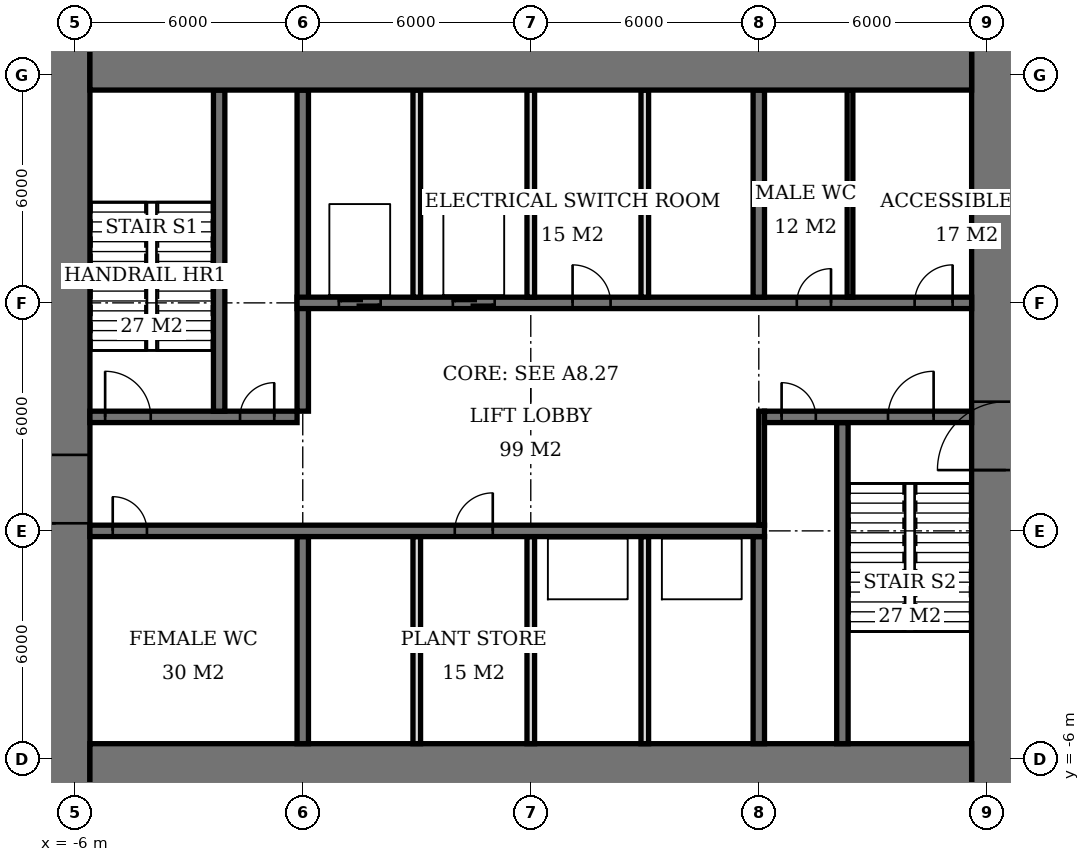
"""IFC4 building model, lengths in metres.
Left out: names, types, materials, properties, quantities, classifications, styles, units other than length and angle.
Written with IfcOpenShell. Run it as: python <this file> out.ifc"""

import sys

from ifc_helpers import new_model, si_unit, direction, frame, frame_2d, origin, place, context, subcontext, project, spatial, rectangle, extrude, element, fill, save


model = new_model("IFC4")
c1 = context("Model", 3, precision=1e-05, world=origin(), true_north=direction((0.0, 1.0)))
c2 = subcontext(c1, "Body", "Model", "MODEL_VIEW")
j1 = project(units=[si_unit("LENGTHUNIT", "METRE"), si_unit("PLANEANGLEUNIT", "RADIAN")], contexts=[c1])
p1 = place(None, origin())
s1 = spatial("IfcSite", under=j1, at=p1, CompositionType="ELEMENT")
p2 = place(p1, origin())
s2 = spatial("IfcBuilding", under=s1, at=p2, CompositionType="ELEMENT")
p3 = place(p2, frame((0.0, 0.0, 239.6)))
s3 = spatial("IfcBuildingStorey", under=s2, at=p3, CompositionType="ELEMENT", Elevation=239.6)
for number, where, z_axis, x_axis in (
    (1, (-5.6, -6.6, 0.0), (0.0, 0.0, 1.0), (1.0, 0.0, 0.0)),
    (2, (-5.6, 12.6, 0.0), (0.0, 0.0, 1.0), (1.0, 0.0, 0.0)),
):
    element("IfcWall", number, at=place(p3, frame(where, z_axis=z_axis, x_axis=x_axis)), inside=s3, PredefinedType="SHEAR", context=c2, shape_type="SweptSolid", body=[
        extrude(rectangle(XDim=23.2, YDim=2.0, at=frame_2d((11.6, 0.0))), origin(), (0.0, 0.0, 1.0), 5.4),
    ])
p4 = place(p3, frame((-6.5, -7.6, 0.0), z_axis=(0.0, 0.0, 1.0), x_axis=(0.0, 1.0, 0.0)))
e3 = element("IfcWall", 3, at=p4, inside=s3, PredefinedType="SHEAR", context=c2, shape_type="SweptSolid", body=[
    extrude(rectangle(XDim=21.2, YDim=1.8, at=frame_2d((10.6, 0.0))), origin(), (0.0, 0.0, 1.0), 5.4),
])
p5 = place(p4, frame((7.8, 0.0, 0.0)))
e4 = element("IfcOpeningElement", 4, at=p5, cuts=e3, PredefinedType="OPENING", context=c2, shape_type="SweptSolid", body=[
    extrude(rectangle(XDim=1.8, YDim=2.4, at=frame_2d((0.9, 1.2))), frame((0.0, 0.91, 0.0), z_axis=(0.0, -1.0, 0.0), x_axis=(1.0, 0.0, 0.0)), (0.0, 0.0, 1.0), 1.82),
])
p6 = place(p3, frame((18.5, -7.6, 0.0), z_axis=(0.0, 0.0, 1.0), x_axis=(0.0, 1.0, 0.0)))
e5 = element("IfcWall", 5, at=p6, inside=s3, PredefinedType="SHEAR", context=c2, shape_type="SweptSolid", body=[
    extrude(rectangle(XDim=21.2, YDim=1.8, at=frame_2d((10.6, 0.0))), origin(), (0.0, 0.0, 1.0), 5.4),
])
p7 = place(p6, frame((9.2, 0.0, 0.0)))
e6 = element("IfcOpeningElement", 6, at=p7, cuts=e5, PredefinedType="OPENING", context=c2, shape_type="SweptSolid", body=[
    extrude(rectangle(XDim=1.8, YDim=2.4, at=frame_2d((0.9, 1.2))), frame((0.0, 0.91, 0.0), z_axis=(0.0, -1.0, 0.0), x_axis=(1.0, 0.0, 0.0)), (0.0, 0.0, 1.0), 1.82),
])
p8 = place(p3, frame((-5.6, 0.0, 0.0), z_axis=(0.0, 0.0, 1.0), x_axis=(1.0, 0.0, 0.0)))
e7 = element("IfcWall", 7, at=p8, inside=s3, PredefinedType="SHEAR", context=c2, shape_type="SweptSolid", body=[
    extrude(rectangle(XDim=17.75, YDim=0.3, at=frame_2d((8.875, 0.0))), origin(), (0.0, 0.0, 1.0), 5.4),
])
p9 = place(p8, frame((0.6, 0.0, 0.0)))
e8 = element("IfcOpeningElement", 8, at=p9, cuts=e7, PredefinedType="OPENING", context=c2, shape_type="SweptSolid", body=[
    extrude(rectangle(XDim=0.9, YDim=2.1, at=frame_2d((0.45, 1.05))), frame((0.0, 0.16, 0.0), z_axis=(0.0, -1.0, 0.0), x_axis=(1.0, 0.0, 0.0)), (0.0, 0.0, 1.0), 0.32),
])
p10 = place(p8, frame((9.6, 0.0, 0.0)))
e9 = element("IfcOpeningElement", 9, at=p10, cuts=e7, PredefinedType="OPENING", context=c2, shape_type="SweptSolid", body=[
    extrude(rectangle(XDim=1.0, YDim=2.1, at=frame_2d((0.5, 1.05))), frame((0.0, 0.16, 0.0), z_axis=(0.0, -1.0, 0.0), x_axis=(1.0, 0.0, 0.0)), (0.0, 0.0, 1.0), 0.32),
])
p11 = place(p3, frame((-5.6, 3.0, 0.0), z_axis=(0.0, 0.0, 1.0), x_axis=(1.0, 0.0, 0.0)))
e10 = element("IfcWall", 10, at=p11, inside=s3, PredefinedType="SHEAR", context=c2, shape_type="SweptSolid", body=[
    extrude(rectangle(XDim=5.45, YDim=0.3, at=frame_2d((2.725, 0.0))), origin(), (0.0, 0.0, 1.0), 5.4),
])
p12 = place(p11, frame((0.4, 0.0, 0.0)))
e11 = element("IfcOpeningElement", 11, at=p12, cuts=e10, PredefinedType="OPENING", context=c2, shape_type="SweptSolid", body=[
    extrude(rectangle(XDim=1.2, YDim=2.1, at=frame_2d((0.6, 1.05))), frame((0.0, 0.16, 0.0), z_axis=(0.0, -1.0, 0.0), x_axis=(1.0, 0.0, 0.0)), (0.0, 0.0, 1.0), 0.32),
])
p13 = place(p11, frame((3.95, 0.0, 0.0)))
e12 = element("IfcOpeningElement", 12, at=p13, cuts=e10, PredefinedType="OPENING", context=c2, shape_type="SweptSolid", body=[
    extrude(rectangle(XDim=0.9, YDim=2.1, at=frame_2d((0.45, 1.05))), frame((0.0, 0.16, 0.0), z_axis=(0.0, -1.0, 0.0), x_axis=(1.0, 0.0, 0.0)), (0.0, 0.0, 1.0), 0.32),
])
p14 = place(p3, frame((12.15, 3.0, 0.0), z_axis=(0.0, 0.0, 1.0), x_axis=(1.0, 0.0, 0.0)))
e13 = element("IfcWall", 13, at=p14, inside=s3, PredefinedType="SHEAR", context=c2, shape_type="SweptSolid", body=[
    extrude(rectangle(XDim=5.45, YDim=0.3, at=frame_2d((2.725, 0.0))), origin(), (0.0, 0.0, 1.0), 5.4),
])
p15 = place(p14, frame((3.25, 0.0, 0.0)))
e14 = element("IfcOpeningElement", 14, at=p15, cuts=e13, PredefinedType="OPENING", context=c2, shape_type="SweptSolid", body=[
    extrude(rectangle(XDim=1.2, YDim=2.1, at=frame_2d((0.6, 1.05))), frame((0.0, 0.16, 0.0), z_axis=(0.0, -1.0, 0.0), x_axis=(1.0, 0.0, 0.0)), (0.0, 0.0, 1.0), 0.32),
])
p16 = place(p14, frame((0.45, 0.0, 0.0)))
e15 = element("IfcOpeningElement", 15, at=p16, cuts=e13, PredefinedType="OPENING", context=c2, shape_type="SweptSolid", body=[
    extrude(rectangle(XDim=0.9, YDim=2.1, at=frame_2d((0.45, 1.05))), frame((0.0, 0.16, 0.0), z_axis=(0.0, -1.0, 0.0), x_axis=(1.0, 0.0, 0.0)), (0.0, 0.0, 1.0), 0.32),
])
p17 = place(p3, frame((-0.15, 6.0, 0.0), z_axis=(0.0, 0.0, 1.0), x_axis=(1.0, 0.0, 0.0)))
e16 = element("IfcWall", 16, at=p17, inside=s3, PredefinedType="SHEAR", context=c2, shape_type="SweptSolid", body=[
    extrude(rectangle(XDim=17.75, YDim=0.3, at=frame_2d((8.875, 0.0))), origin(), (0.0, 0.0, 1.0), 5.4),
])
p18 = place(p17, frame((13.15, 0.0, 0.0)))
e17 = element("IfcOpeningElement", 17, at=p18, cuts=e16, PredefinedType="OPENING", context=c2, shape_type="SweptSolid", body=[
    extrude(rectangle(XDim=0.9, YDim=2.1, at=frame_2d((0.45, 1.05))), frame((0.0, 0.16, 0.0), z_axis=(0.0, -1.0, 0.0), x_axis=(1.0, 0.0, 0.0)), (0.0, 0.0, 1.0), 0.32),
])
p19 = place(p17, frame((16.25, 0.0, 0.0)))
e18 = element("IfcOpeningElement", 18, at=p19, cuts=e16, PredefinedType="OPENING", context=c2, shape_type="SweptSolid", body=[
    extrude(rectangle(XDim=1.0, YDim=2.1, at=frame_2d((0.5, 1.05))), frame((0.0, 0.16, 0.0), z_axis=(0.0, -1.0, 0.0), x_axis=(1.0, 0.0, 0.0)), (0.0, 0.0, 1.0), 0.32),
])
p20 = place(p17, frame((7.25, 0.0, 0.0)))
e19 = element("IfcOpeningElement", 19, at=p20, cuts=e16, PredefinedType="OPENING", context=c2, shape_type="SweptSolid", body=[
    extrude(rectangle(XDim=1.0, YDim=2.1, at=frame_2d((0.5, 1.05))), frame((0.0, 0.16, 0.0), z_axis=(0.0, -1.0, 0.0), x_axis=(1.0, 0.0, 0.0)), (0.0, 0.0, 1.0), 0.32),
])
p21 = place(p17, frame((1.1, 0.0, 0.0)))
e20 = element("IfcOpeningElement", 20, at=p21, cuts=e16, PredefinedType="OPENING", context=c2, shape_type="SweptSolid", body=[
    extrude(rectangle(XDim=1.1, YDim=2.1, at=frame_2d((0.55, 1.05))), frame((0.0, 0.16, 0.0), z_axis=(0.0, -1.0, 0.0), x_axis=(1.0, 0.0, 0.0)), (0.0, 0.0, 1.0), 0.32),
])
p22 = place(p17, frame((4.1, 0.0, 0.0)))
e21 = element("IfcOpeningElement", 21, at=p22, cuts=e16, PredefinedType="OPENING", context=c2, shape_type="SweptSolid", body=[
    extrude(rectangle(XDim=1.1, YDim=2.1, at=frame_2d((0.55, 1.05))), frame((0.0, 0.16, 0.0), z_axis=(0.0, -1.0, 0.0), x_axis=(1.0, 0.0, 0.0)), (0.0, 0.0, 1.0), 0.32),
])
p23 = place(p3, frame((0.0, -5.6, 0.0), z_axis=(0.0, 0.0, 1.0), x_axis=(0.0, 1.0, 0.0)))
e22 = element("IfcWall", 22, at=p23, inside=s3, PredefinedType="SHEAR", context=c2, shape_type="SweptSolid", body=[
    extrude(rectangle(XDim=5.45, YDim=0.3, at=frame_2d((2.725, 0.0))), origin(), (0.0, 0.0, 1.0), 5.4),
])
p24 = place(p3, frame((0.0, 3.15, 0.0), z_axis=(0.0, 0.0, 1.0), x_axis=(0.0, 1.0, 0.0)))
e23 = element("IfcWall", 23, at=p24, inside=s3, PredefinedType="SHEAR", context=c2, shape_type="SweptSolid", body=[
    extrude(rectangle(XDim=8.45, YDim=0.3, at=frame_2d((4.225, 0.0))), origin(), (0.0, 0.0, 1.0), 5.4),
])
for number, where, z_axis, x_axis in (
    (24, (12.0, -5.6, 0.0), (0.0, 0.0, 1.0), (0.0, 1.0, 0.0)),
    (25, (12.0, 6.15, 0.0), (0.0, 0.0, 1.0), (0.0, 1.0, 0.0)),
):
    element("IfcWall", number, at=place(p3, frame(where, z_axis=z_axis, x_axis=x_axis)), inside=s3, PredefinedType="SHEAR", context=c2, shape_type="SweptSolid", body=[
        extrude(rectangle(XDim=5.45, YDim=0.3, at=frame_2d((2.725, 0.0))), origin(), (0.0, 0.0, 1.0), 5.4),
    ])
for number, where, z_axis, x_axis in (
    (26, (-2.2, 3.15, 0.0), (0.0, 0.0, 1.0), (0.0, 1.0, 0.0)),
    (27, (14.2, -5.6, 0.0), (0.0, 0.0, 1.0), (0.0, 1.0, 0.0)),
):
    element("IfcWall", number, at=place(p3, frame(where, z_axis=z_axis, x_axis=x_axis)), inside=s3, PredefinedType="SHEAR", context=c2, shape_type="SweptSolid", body=[
        extrude(rectangle(XDim=8.45, YDim=0.3, at=frame_2d((4.225, 0.0))), origin(), (0.0, 0.0, 1.0), 5.4),
    ])
for number, where, z_axis, x_axis in (
    (28, (3.0, 6.15, 0.0), (0.0, 0.0, 1.0), (0.0, 1.0, 0.0)),
    (29, (6.0, 6.15, 0.0), (0.0, 0.0, 1.0), (0.0, 1.0, 0.0)),
    (30, (9.0, 6.15, 0.0), (0.0, 0.0, 1.0), (0.0, 1.0, 0.0)),
    (31, (3.0, -5.6, 0.0), (0.0, 0.0, 1.0), (0.0, 1.0, 0.0)),
    (32, (6.0, -5.6, 0.0), (0.0, 0.0, 1.0), (0.0, 1.0, 0.0)),
    (33, (9.0, -5.6, 0.0), (0.0, 0.0, 1.0), (0.0, 1.0, 0.0)),
):
    element("IfcWall", number, at=place(p3, frame(where, z_axis=z_axis, x_axis=x_axis)), inside=s3, PredefinedType="SOLIDWALL", context=c2, shape_type="SweptSolid", body=[
        extrude(rectangle(XDim=5.45, YDim=0.2, at=frame_2d((2.725, 0.0))), origin(), (0.0, 0.0, 1.0), 5.4),
    ])
p25 = place(p3, frame((-13.329, -6.651, 0.0), z_axis=(0.0, 0.0, 1.0), x_axis=(0.707106781187, -0.707106781187, 0.0)))
e34 = element("IfcWall", 34, at=p25, inside=s3, PredefinedType="USERDEFINED", context=c2, shape_type="SweptSolid", body=[
    extrude(rectangle(XDim=9.445, YDim=0.2, at=frame_2d((4.723, 0.0))), origin(), (0.0, 0.0, 1.0), 5.4),
])
p26 = place(p25, frame((0.274, 0.0, 0.6)))
e35 = element("IfcOpeningElement", 35, at=p26, cuts=e34, PredefinedType="OPENING", context=c2, shape_type="SweptSolid", body=[
    extrude(rectangle(XDim=2.6, YDim=3.0, at=frame_2d((1.3, 1.5))), frame((0.0, 0.11, 0.0), z_axis=(0.0, -1.0, 0.0), x_axis=(1.0, 0.0, 0.0)), (0.0, 0.0, 1.0), 0.22),
])
p27 = place(p25, frame((3.423, 0.0, 0.6)))
e36 = element("IfcOpeningElement", 36, at=p27, cuts=e34, PredefinedType="OPENING", context=c2, shape_type="SweptSolid", body=[
    extrude(rectangle(XDim=2.6, YDim=3.0, at=frame_2d((1.3, 1.5))), frame((0.0, 0.11, 0.0), z_axis=(0.0, -1.0, 0.0), x_axis=(1.0, 0.0, 0.0)), (0.0, 0.0, 1.0), 0.22),
])
p28 = place(p25, frame((6.571, 0.0, 0.6)))
e37 = element("IfcOpeningElement", 37, at=p28, cuts=e34, PredefinedType="OPENING", context=c2, shape_type="SweptSolid", body=[
    extrude(rectangle(XDim=2.6, YDim=3.0, at=frame_2d((1.3, 1.5))), frame((0.0, 0.11, 0.0), z_axis=(0.0, -1.0, 0.0), x_axis=(1.0, 0.0, 0.0)), (0.0, 0.0, 1.0), 0.22),
])
p29 = place(p3, frame((14.4, 6.15, 0.0), z_axis=(0.0, 0.0, 1.0), x_axis=(0.0, 1.0, 0.0)))
e38 = element("IfcWall", 38, at=p29, inside=s3, PredefinedType="PLUMBINGWALL", context=c2, shape_type="SweptSolid", body=[
    extrude(rectangle(XDim=5.45, YDim=0.15, at=frame_2d((2.725, 0.0))), origin(), (0.0, 0.0, 1.0), 5.15),
])
p30 = place(p3, frame((12.075, 0.15, 0.0), z_axis=(0.0, 0.0, 1.0), x_axis=(0.0, 1.0, 0.0)))
e39 = element("IfcWall", 39, at=p30, inside=s3, PredefinedType="PARTITIONING", context=c2, shape_type="SweptSolid", body=[
    extrude(rectangle(XDim=3.0, YDim=0.15, at=frame_2d((1.5, 0.0))), origin(), (0.0, 0.0, 1.0), 5.15),
])
p31 = place(p5, origin())
e40 = element("IfcDoor", 40, at=p31, inside=s3, OperationType="DOUBLE_DOOR_SINGLE_SWING", PredefinedType="DOOR", context=c2, shape_type="SweptSolid", body=[
    extrude(rectangle(XDim=1.8, YDim=2.4, at=frame_2d((0.9, 1.2))), frame((0.0, 0.025, 0.0), z_axis=(0.0, -1.0, 0.0), x_axis=(1.0, 0.0, 0.0)), (0.0, 0.0, 1.0), 0.05),
])
fill(e4, e40)
p32 = place(p7, origin())
e41 = element("IfcDoor", 41, at=p32, inside=s3, OperationType="DOUBLE_DOOR_SINGLE_SWING", PredefinedType="DOOR", context=c2, shape_type="SweptSolid", body=[
    extrude(rectangle(XDim=1.8, YDim=2.4, at=frame_2d((0.9, 1.2))), frame((0.0, 0.025, 0.0), z_axis=(0.0, -1.0, 0.0), x_axis=(1.0, 0.0, 0.0)), (0.0, 0.0, 1.0), 0.05),
])
fill(e6, e41)
p33 = place(p12, origin())
e42 = element("IfcDoor", 42, at=p33, inside=s3, OperationType="SINGLE_SWING_LEFT", PredefinedType="DOOR", context=c2, shape_type="SweptSolid", body=[
    extrude(rectangle(XDim=1.2, YDim=2.1, at=frame_2d((0.6, 1.05))), frame((0.0, 0.025, 0.0), z_axis=(0.0, -1.0, 0.0), x_axis=(1.0, 0.0, 0.0)), (0.0, 0.0, 1.0), 0.05),
])
fill(e11, e42)
p34 = place(p13, origin())
e43 = element("IfcDoor", 43, at=p34, inside=s3, OperationType="SINGLE_SWING_RIGHT", PredefinedType="DOOR", context=c2, shape_type="SweptSolid", body=[
    extrude(rectangle(XDim=0.9, YDim=2.1, at=frame_2d((0.45, 1.05))), frame((0.0, 0.025, 0.0), z_axis=(0.0, -1.0, 0.0), x_axis=(1.0, 0.0, 0.0)), (0.0, 0.0, 1.0), 0.05),
])
fill(e12, e43)
p35 = place(p15, origin())
e44 = element("IfcDoor", 44, at=p35, inside=s3, OperationType="SINGLE_SWING_RIGHT", PredefinedType="DOOR", context=c2, shape_type="SweptSolid", body=[
    extrude(rectangle(XDim=1.2, YDim=2.1, at=frame_2d((0.6, 1.05))), frame((0.0, 0.025, 0.0), z_axis=(0.0, -1.0, 0.0), x_axis=(1.0, 0.0, 0.0)), (0.0, 0.0, 1.0), 0.05),
])
fill(e14, e44)
p36 = place(p16, origin())
e45 = element("IfcDoor", 45, at=p36, inside=s3, OperationType="SINGLE_SWING_LEFT", PredefinedType="DOOR", context=c2, shape_type="SweptSolid", body=[
    extrude(rectangle(XDim=0.9, YDim=2.1, at=frame_2d((0.45, 1.05))), frame((0.0, 0.025, 0.0), z_axis=(0.0, -1.0, 0.0), x_axis=(1.0, 0.0, 0.0)), (0.0, 0.0, 1.0), 0.05),
])
fill(e15, e45)
p37 = place(p9, origin())
e46 = element("IfcDoor", 46, at=p37, inside=s3, OperationType="SINGLE_SWING_LEFT", PredefinedType="DOOR", context=c2, shape_type="SweptSolid", body=[
    extrude(rectangle(XDim=0.9, YDim=2.1, at=frame_2d((0.45, 1.05))), frame((0.0, 0.025, 0.0), z_axis=(0.0, -1.0, 0.0), x_axis=(1.0, 0.0, 0.0)), (0.0, 0.0, 1.0), 0.05),
])
fill(e8, e46)
p38 = place(p18, origin())
e47 = element("IfcDoor", 47, at=p38, inside=s3, OperationType="SINGLE_SWING_RIGHT", PredefinedType="DOOR", context=c2, shape_type="SweptSolid", body=[
    extrude(rectangle(XDim=0.9, YDim=2.1, at=frame_2d((0.45, 1.05))), frame((0.0, 0.025, 0.0), z_axis=(0.0, -1.0, 0.0), x_axis=(1.0, 0.0, 0.0)), (0.0, 0.0, 1.0), 0.05),
])
fill(e17, e47)
p39 = place(p19, origin())
e48 = element("IfcDoor", 48, at=p39, inside=s3, OperationType="SINGLE_SWING_RIGHT", PredefinedType="DOOR", context=c2, shape_type="SweptSolid", body=[
    extrude(rectangle(XDim=1.0, YDim=2.1, at=frame_2d((0.5, 1.05))), frame((0.0, 0.025, 0.0), z_axis=(0.0, -1.0, 0.0), x_axis=(1.0, 0.0, 0.0)), (0.0, 0.0, 1.0), 0.05),
])
fill(e18, e48)
p40 = place(p20, origin())
e49 = element("IfcDoor", 49, at=p40, inside=s3, OperationType="SINGLE_SWING_LEFT", PredefinedType="DOOR", context=c2, shape_type="SweptSolid", body=[
    extrude(rectangle(XDim=1.0, YDim=2.1, at=frame_2d((0.5, 1.05))), frame((0.0, 0.025, 0.0), z_axis=(0.0, -1.0, 0.0), x_axis=(1.0, 0.0, 0.0)), (0.0, 0.0, 1.0), 0.05),
])
fill(e19, e49)
p41 = place(p10, origin())
e50 = element("IfcDoor", 50, at=p41, inside=s3, OperationType="SINGLE_SWING_RIGHT", PredefinedType="DOOR", context=c2, shape_type="SweptSolid", body=[
    extrude(rectangle(XDim=1.0, YDim=2.1, at=frame_2d((0.5, 1.05))), frame((0.0, 0.025, 0.0), z_axis=(0.0, -1.0, 0.0), x_axis=(1.0, 0.0, 0.0)), (0.0, 0.0, 1.0), 0.05),
])
fill(e9, e50)
p42 = place(p21, origin())
e51 = element("IfcDoor", 51, at=p42, inside=s3, OperationType="DOUBLE_DOOR_SLIDING", PredefinedType="USERDEFINED", context=c2, shape_type="SweptSolid", body=[
    extrude(rectangle(XDim=1.1, YDim=2.1, at=frame_2d((0.55, 1.05))), frame((0.0, 0.025, 0.0), z_axis=(0.0, -1.0, 0.0), x_axis=(1.0, 0.0, 0.0)), (0.0, 0.0, 1.0), 0.05),
])
fill(e20, e51)
p43 = place(p22, origin())
e52 = element("IfcDoor", 52, at=p43, inside=s3, OperationType="DOUBLE_DOOR_SLIDING", PredefinedType="USERDEFINED", context=c2, shape_type="SweptSolid", body=[
    extrude(rectangle(XDim=1.1, YDim=2.1, at=frame_2d((0.55, 1.05))), frame((0.0, 0.025, 0.0), z_axis=(0.0, -1.0, 0.0), x_axis=(1.0, 0.0, 0.0)), (0.0, 0.0, 1.0), 0.05),
])
fill(e21, e52)
save(model, sys.argv[1])
